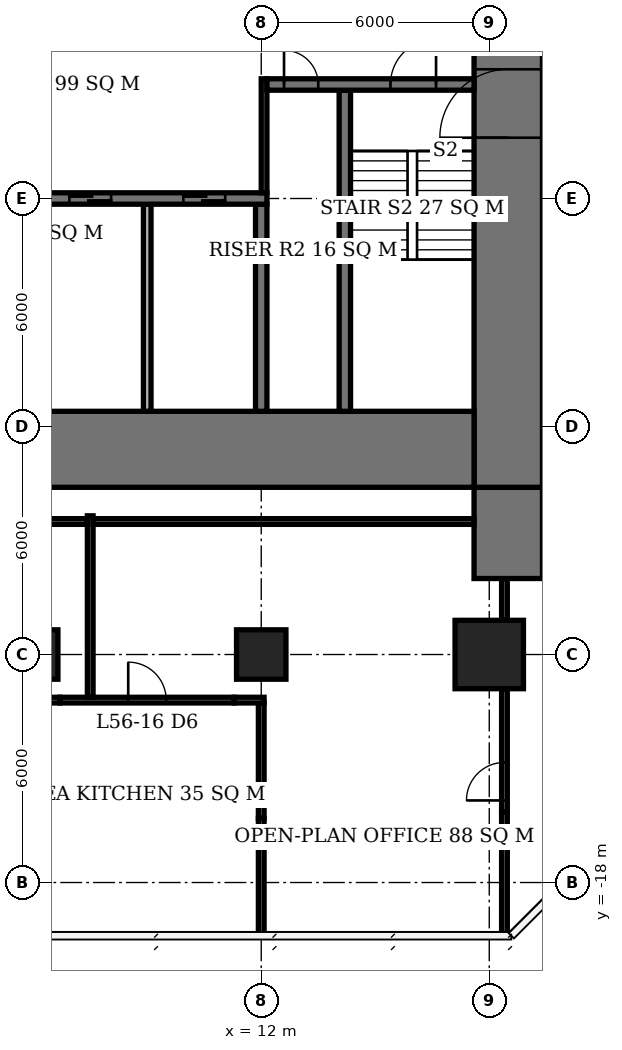
"""IFC4 building model, lengths in metres.
Left out: names, types, materials, properties, quantities, classifications, styles, units other than length and angle.
Written with IfcOpenShell. Run it as: python <this file> out.ifc"""

import sys

from ifc_helpers import new_model, si_unit, direction, frame, frame_2d, origin, origin_2d, place, context, subcontext, project, spatial, rectangle, extrude, element, fill, save


model = new_model("IFC4")
c1 = context("Model", 3, precision=1e-05, world=origin(), true_north=direction((0.0, 1.0)))
c2 = subcontext(c1, "Body", "Model", "MODEL_VIEW")
j1 = project(units=[si_unit("LENGTHUNIT", "METRE"), si_unit("PLANEANGLEUNIT", "RADIAN")], contexts=[c1])
p1 = place(None, origin())
s1 = spatial("IfcSite", under=j1, at=p1, CompositionType="ELEMENT")
p2 = place(p1, origin())
s2 = spatial("IfcBuilding", under=s1, at=p2, CompositionType="ELEMENT")
p3 = place(p2, frame((0.0, 0.0, 227.9)))
s3 = spatial("IfcBuildingStorey", under=s2, at=p3, CompositionType="ELEMENT", Elevation=227.9)
for number, where, z_axis, x_axis in (
    (1, (6.0, -12.0, 0.0), (0.0, 0.0, 1.0), (1.0, 0.0, 0.0)),
    (2, (12.0, -12.0, 0.0), (0.0, 0.0, 1.0), (1.0, 0.0, 0.0)),
):
    element("IfcColumn", number, at=place(p3, frame(where, z_axis=z_axis, x_axis=x_axis)), inside=s3, PredefinedType="COLUMN", context=c2, shape_type="SweptSolid", body=[
        extrude(rectangle(XDim=1.3, YDim=1.3, at=origin_2d()), origin(), (0.0, 0.0, 1.0), 3.9),
    ])
p4 = place(p3, frame((18.0, -12.0, 0.0), z_axis=(0.0, 0.0, 1.0), x_axis=(1.0, 0.0, 0.0)))
e3 = element("IfcColumn", 3, at=p4, inside=s3, PredefinedType="COLUMN", context=c2, shape_type="SweptSolid", body=[
    extrude(rectangle(XDim=1.8, YDim=1.8, at=origin_2d()), origin(), (0.0, 0.0, 1.0), 3.9),
])
p5 = place(p3, frame((-5.6, -6.6, 0.0), z_axis=(0.0, 0.0, 1.0), x_axis=(1.0, 0.0, 0.0)))
e4 = element("IfcWall", 4, at=p5, inside=s3, PredefinedType="SHEAR", context=c2, shape_type="SweptSolid", body=[
    extrude(rectangle(XDim=23.2, YDim=2.0, at=frame_2d((11.6, 0.0))), origin(), (0.0, 0.0, 1.0), 3.9),
])
p6 = place(p3, frame((18.5, -7.6, 0.0), z_axis=(0.0, 0.0, 1.0), x_axis=(0.0, 1.0, 0.0)))
e5 = element("IfcWall", 5, at=p6, inside=s3, PredefinedType="SHEAR", context=c2, shape_type="SweptSolid", body=[
    extrude(rectangle(XDim=21.2, YDim=1.8, at=frame_2d((10.6, 0.0))), origin(), (0.0, 0.0, 1.0), 3.9),
])
p7 = place(p6, frame((9.2, 0.0, 0.0)))
e6 = element("IfcOpeningElement", 6, at=p7, cuts=e5, PredefinedType="OPENING", context=c2, shape_type="SweptSolid", body=[
    extrude(rectangle(XDim=1.8, YDim=2.4, at=frame_2d((0.9, 1.2))), frame((0.0, 0.91, 0.0), z_axis=(0.0, -1.0, 0.0), x_axis=(1.0, 0.0, 0.0)), (0.0, 0.0, 1.0), 1.82),
])
p8 = place(p3, frame((18.5, -10.0, 0.0), z_axis=(0.0, 0.0, 1.0), x_axis=(0.0, 1.0, 0.0)))
e7 = element("IfcWall", 7, at=p8, inside=s3, PredefinedType="SHEAR", context=c2, shape_type="SweptSolid", body=[
    extrude(rectangle(XDim=2.4, YDim=1.8, at=frame_2d((1.2, 0.0))), origin(), (0.0, 0.0, 1.0), 3.9),
])
p9 = place(p3, frame((-5.6, 0.0, 0.0), z_axis=(0.0, 0.0, 1.0), x_axis=(1.0, 0.0, 0.0)))
e8 = element("IfcWall", 8, at=p9, inside=s3, PredefinedType="SHEAR", context=c2, shape_type="SweptSolid", body=[
    extrude(rectangle(XDim=17.75, YDim=0.3, at=frame_2d((8.875, 0.0))), origin(), (0.0, 0.0, 1.0), 3.9),
])
p10 = place(p9, frame((0.6, 0.0, 0.0)))
e9 = element("IfcOpeningElement", 9, at=p10, cuts=e8, PredefinedType="OPENING", context=c2, shape_type="SweptSolid", body=[
    extrude(rectangle(XDim=0.9, YDim=2.1, at=frame_2d((0.45, 1.05))), frame((0.0, 0.16, 0.0), z_axis=(0.0, -1.0, 0.0), x_axis=(1.0, 0.0, 0.0)), (0.0, 0.0, 1.0), 0.32),
])
p11 = place(p9, frame((3.7, 0.0, 0.0)))
e10 = element("IfcOpeningElement", 10, at=p11, cuts=e8, PredefinedType="OPENING", context=c2, shape_type="SweptSolid", body=[
    extrude(rectangle(XDim=1.0, YDim=2.1, at=frame_2d((0.5, 1.05))), frame((0.0, 0.16, 0.0), z_axis=(0.0, -1.0, 0.0), x_axis=(1.0, 0.0, 0.0)), (0.0, 0.0, 1.0), 0.32),
])
p12 = place(p9, frame((9.6, 0.0, 0.0)))
e11 = element("IfcOpeningElement", 11, at=p12, cuts=e8, PredefinedType="OPENING", context=c2, shape_type="SweptSolid", body=[
    extrude(rectangle(XDim=1.0, YDim=2.1, at=frame_2d((0.5, 1.05))), frame((0.0, 0.16, 0.0), z_axis=(0.0, -1.0, 0.0), x_axis=(1.0, 0.0, 0.0)), (0.0, 0.0, 1.0), 0.32),
])
p13 = place(p9, frame((12.55, 0.0, 0.0)))
e12 = element("IfcOpeningElement", 12, at=p13, cuts=e8, PredefinedType="OPENING", context=c2, shape_type="SweptSolid", body=[
    extrude(rectangle(XDim=1.1, YDim=2.1, at=frame_2d((0.55, 1.05))), frame((0.0, 0.16, 0.0), z_axis=(0.0, -1.0, 0.0), x_axis=(1.0, 0.0, 0.0)), (0.0, 0.0, 1.0), 0.32),
])
p14 = place(p9, frame((15.55, 0.0, 0.0)))
e13 = element("IfcOpeningElement", 13, at=p14, cuts=e8, PredefinedType="OPENING", context=c2, shape_type="SweptSolid", body=[
    extrude(rectangle(XDim=1.1, YDim=2.1, at=frame_2d((0.55, 1.05))), frame((0.0, 0.16, 0.0), z_axis=(0.0, -1.0, 0.0), x_axis=(1.0, 0.0, 0.0)), (0.0, 0.0, 1.0), 0.32),
])
p15 = place(p3, frame((12.15, 3.0, 0.0), z_axis=(0.0, 0.0, 1.0), x_axis=(1.0, 0.0, 0.0)))
e14 = element("IfcWall", 14, at=p15, inside=s3, PredefinedType="SHEAR", context=c2, shape_type="SweptSolid", body=[
    extrude(rectangle(XDim=5.45, YDim=0.3, at=frame_2d((2.725, 0.0))), origin(), (0.0, 0.0, 1.0), 3.9),
])
p16 = place(p15, frame((3.25, 0.0, 0.0)))
e15 = element("IfcOpeningElement", 15, at=p16, cuts=e14, PredefinedType="OPENING", context=c2, shape_type="SweptSolid", body=[
    extrude(rectangle(XDim=1.2, YDim=2.1, at=frame_2d((0.6, 1.05))), frame((0.0, 0.16, 0.0), z_axis=(0.0, -1.0, 0.0), x_axis=(1.0, 0.0, 0.0)), (0.0, 0.0, 1.0), 0.32),
])
p17 = place(p15, frame((0.45, 0.0, 0.0)))
e16 = element("IfcOpeningElement", 16, at=p17, cuts=e14, PredefinedType="OPENING", context=c2, shape_type="SweptSolid", body=[
    extrude(rectangle(XDim=0.9, YDim=2.1, at=frame_2d((0.45, 1.05))), frame((0.0, 0.16, 0.0), z_axis=(0.0, -1.0, 0.0), x_axis=(1.0, 0.0, 0.0)), (0.0, 0.0, 1.0), 0.32),
])
p18 = place(p3, frame((12.0, -5.6, 0.0), z_axis=(0.0, 0.0, 1.0), x_axis=(0.0, 1.0, 0.0)))
e17 = element("IfcWall", 17, at=p18, inside=s3, PredefinedType="SHEAR", context=c2, shape_type="SweptSolid", body=[
    extrude(rectangle(XDim=5.45, YDim=0.3, at=frame_2d((2.725, 0.0))), origin(), (0.0, 0.0, 1.0), 3.9),
])
p19 = place(p3, frame((14.2, -5.6, 0.0), z_axis=(0.0, 0.0, 1.0), x_axis=(0.0, 1.0, 0.0)))
e18 = element("IfcWall", 18, at=p19, inside=s3, PredefinedType="SHEAR", context=c2, shape_type="SweptSolid", body=[
    extrude(rectangle(XDim=8.45, YDim=0.3, at=frame_2d((4.225, 0.0))), origin(), (0.0, 0.0, 1.0), 3.9),
])
p20 = place(p3, frame((9.0, -5.6, 0.0), z_axis=(0.0, 0.0, 1.0), x_axis=(0.0, 1.0, 0.0)))
e19 = element("IfcWall", 19, at=p20, inside=s3, PredefinedType="SOLIDWALL", context=c2, shape_type="SweptSolid", body=[
    extrude(rectangle(XDim=5.45, YDim=0.2, at=frame_2d((2.725, 0.0))), origin(), (0.0, 0.0, 1.0), 3.9),
])
p21 = place(p3, frame((5.925, -13.2, 0.0), z_axis=(0.0, 0.0, 1.0), x_axis=(1.0, 0.0, 0.0)))
e20 = element("IfcWall", 20, at=p21, inside=s3, PredefinedType="PARTITIONING", context=c2, shape_type="SweptSolid", body=[
    extrude(rectangle(XDim=0.785, YDim=0.15, at=frame_2d((0.393, 0.0))), origin(), (0.0, 0.0, 1.0), 2.65),
])
p22 = place(p3, frame((6.71, -13.2, 0.0), z_axis=(0.0, 0.0, 1.0), x_axis=(1.0, 0.0, 0.0)))
e21 = element("IfcWall", 21, at=p22, inside=s3, PredefinedType="PARTITIONING", context=c2, shape_type="SweptSolid", body=[
    extrude(rectangle(XDim=4.58, YDim=0.15, at=frame_2d((2.29, 0.0))), origin(), (0.0, 0.0, 1.0), 3.65),
])
p23 = place(p22, frame((1.79, 0.0, 0.0)))
e22 = element("IfcOpeningElement", 22, at=p23, cuts=e21, PredefinedType="OPENING", context=c2, shape_type="SweptSolid", body=[
    extrude(rectangle(XDim=1.0, YDim=2.1, at=frame_2d((0.5, 1.05))), frame((0.0, 0.085, 0.0), z_axis=(0.0, -1.0, 0.0), x_axis=(1.0, 0.0, 0.0)), (0.0, 0.0, 1.0), 0.17),
])
p24 = place(p3, frame((11.29, -13.2, 0.0), z_axis=(0.0, 0.0, 1.0), x_axis=(1.0, 0.0, 0.0)))
e23 = element("IfcWall", 23, at=p24, inside=s3, PredefinedType="PARTITIONING", context=c2, shape_type="SweptSolid", body=[
    extrude(rectangle(XDim=0.785, YDim=0.15, at=frame_2d((0.393, 0.0))), origin(), (0.0, 0.0, 1.0), 2.65),
])
p25 = place(p3, frame((12.0, -19.4, 0.0), z_axis=(0.0, 0.0, 1.0), x_axis=(0.0, 1.0, 0.0)))
e24 = element("IfcWall", 24, at=p25, inside=s3, PredefinedType="PARTITIONING", context=c2, shape_type="SweptSolid", body=[
    extrude(rectangle(XDim=3.09, YDim=0.15, at=frame_2d((1.545, 0.0))), origin(), (0.0, 0.0, 1.0), 3.65),
])
p26 = place(p3, frame((12.0, -16.31, 0.0), z_axis=(0.0, 0.0, 1.0), x_axis=(0.0, 1.0, 0.0)))
e25 = element("IfcWall", 25, at=p26, inside=s3, PredefinedType="PARTITIONING", context=c2, shape_type="SweptSolid", body=[
    extrude(rectangle(XDim=3.035, YDim=0.15, at=frame_2d((1.518, 0.0))), origin(), (0.0, 0.0, 1.0), 2.65),
])
p27 = place(p3, frame((7.425, -8.5, 0.0), z_axis=(0.0, 0.0, 1.0), x_axis=(-1.0, 0.0, 0.0)))
e26 = element("IfcWall", 26, at=p27, inside=s3, PredefinedType="PARTITIONING", context=c2, shape_type="SweptSolid", body=[
    extrude(rectangle(XDim=8.925, YDim=0.15, at=frame_2d((4.462, 0.0))), origin(), (0.0, 0.0, 1.0), 3.65),
])
p28 = place(p27, frame((5.275, 0.0, 0.0)))
e27 = element("IfcOpeningElement", 27, at=p28, cuts=e26, PredefinedType="OPENING", context=c2, shape_type="SweptSolid", body=[
    extrude(rectangle(XDim=1.0, YDim=2.1, at=frame_2d((0.5, 1.05))), frame((0.0, 0.085, 0.0), z_axis=(0.0, -1.0, 0.0), x_axis=(1.0, 0.0, 0.0)), (0.0, 0.0, 1.0), 0.17),
])
p29 = place(p3, frame((7.5, -13.125, 0.0), z_axis=(0.0, 0.0, 1.0), x_axis=(0.0, 1.0, 0.0)))
e28 = element("IfcWall", 28, at=p29, inside=s3, PredefinedType="PARTITIONING", context=c2, shape_type="SweptSolid", body=[
    extrude(rectangle(XDim=4.775, YDim=0.15, at=frame_2d((2.387, 0.0))), origin(), (0.0, 0.0, 1.0), 3.65),
])
p30 = place(p3, frame((7.575, -8.5, 0.0), z_axis=(0.0, 0.0, 1.0), x_axis=(1.0, 0.0, 0.0)))
e29 = element("IfcWall", 29, at=p30, inside=s3, PredefinedType="PARTITIONING", context=c2, shape_type="SweptSolid", body=[
    extrude(rectangle(XDim=10.025, YDim=0.15, at=frame_2d((5.013, 0.0))), origin(), (0.0, 0.0, 1.0), 3.65),
])
p31 = place(p3, frame((18.4, -19.4, 0.0), z_axis=(0.0, 0.0, 1.0), x_axis=(0.0, 1.0, 0.0)))
e30 = element("IfcWall", 30, at=p31, inside=s3, PredefinedType="PARTITIONING", context=c2, shape_type="SweptSolid", body=[
    extrude(rectangle(XDim=3.26, YDim=0.15, at=frame_2d((1.63, 0.0))), origin(), (0.0, 0.0, 1.0), 3.65),
])
p32 = place(p3, frame((18.4, -16.14, 0.0), z_axis=(0.0, 0.0, 1.0), x_axis=(0.0, 1.0, 0.0)))
e31 = element("IfcWall", 31, at=p32, inside=s3, PredefinedType="PARTITIONING", context=c2, shape_type="SweptSolid", body=[
    extrude(rectangle(XDim=3.24, YDim=0.15, at=frame_2d((1.62, 0.0))), origin(), (0.0, 0.0, 1.0), 2.65),
])
p33 = place(p32, frame((0.3, 0.0, 0.0)))
e32 = element("IfcOpeningElement", 32, at=p33, cuts=e31, PredefinedType="OPENING", context=c2, shape_type="SweptSolid", body=[
    extrude(rectangle(XDim=1.0, YDim=2.1, at=frame_2d((0.5, 1.05))), frame((0.0, 0.085, 0.0), z_axis=(0.0, -1.0, 0.0), x_axis=(1.0, 0.0, 0.0)), (0.0, 0.0, 1.0), 0.17),
])
p34 = place(p3, frame((18.4, -11.1, 0.0), z_axis=(0.0, 0.0, 1.0), x_axis=(0.0, 1.0, 0.0)))
e33 = element("IfcWall", 33, at=p34, inside=s3, PredefinedType="PARTITIONING", context=c2, shape_type="SweptSolid", body=[
    extrude(rectangle(XDim=1.1, YDim=0.15, at=frame_2d((0.55, 0.0))), origin(), (0.0, 0.0, 1.0), 3.65),
])
p35 = place(p3, frame((12.075, 0.15, 0.0), z_axis=(0.0, 0.0, 1.0), x_axis=(0.0, 1.0, 0.0)))
e34 = element("IfcWall", 34, at=p35, inside=s3, PredefinedType="PARTITIONING", context=c2, shape_type="SweptSolid", body=[
    extrude(rectangle(XDim=3.0, YDim=0.15, at=frame_2d((1.5, 0.0))), origin(), (0.0, 0.0, 1.0), 3.65),
])
p36 = place(p7, origin())
e35 = element("IfcDoor", 35, at=p36, inside=s3, OperationType="DOUBLE_DOOR_SINGLE_SWING", PredefinedType="DOOR", context=c2, shape_type="SweptSolid", body=[
    extrude(rectangle(XDim=1.8, YDim=2.4, at=frame_2d((0.9, 1.2))), frame((0.0, 0.025, 0.0), z_axis=(0.0, -1.0, 0.0), x_axis=(1.0, 0.0, 0.0)), (0.0, 0.0, 1.0), 0.05),
])
fill(e6, e35)
p37 = place(p16, origin())
e36 = element("IfcDoor", 36, at=p37, inside=s3, OperationType="SINGLE_SWING_RIGHT", PredefinedType="DOOR", context=c2, shape_type="SweptSolid", body=[
    extrude(rectangle(XDim=1.2, YDim=2.1, at=frame_2d((0.6, 1.05))), frame((0.0, 0.025, 0.0), z_axis=(0.0, -1.0, 0.0), x_axis=(1.0, 0.0, 0.0)), (0.0, 0.0, 1.0), 0.05),
])
fill(e15, e36)
p38 = place(p17, origin())
e37 = element("IfcDoor", 37, at=p38, inside=s3, OperationType="SINGLE_SWING_LEFT", PredefinedType="DOOR", context=c2, shape_type="SweptSolid", body=[
    extrude(rectangle(XDim=0.9, YDim=2.1, at=frame_2d((0.45, 1.05))), frame((0.0, 0.025, 0.0), z_axis=(0.0, -1.0, 0.0), x_axis=(1.0, 0.0, 0.0)), (0.0, 0.0, 1.0), 0.05),
])
fill(e16, e37)
p39 = place(p13, origin())
e38 = element("IfcDoor", 38, at=p39, inside=s3, OperationType="DOUBLE_DOOR_SLIDING", PredefinedType="USERDEFINED", context=c2, shape_type="SweptSolid", body=[
    extrude(rectangle(XDim=1.1, YDim=2.1, at=frame_2d((0.55, 1.05))), frame((0.0, 0.025, 0.0), z_axis=(0.0, -1.0, 0.0), x_axis=(1.0, 0.0, 0.0)), (0.0, 0.0, 1.0), 0.05),
])
fill(e12, e38)
p40 = place(p14, origin())
e39 = element("IfcDoor", 39, at=p40, inside=s3, OperationType="DOUBLE_DOOR_SLIDING", PredefinedType="USERDEFINED", context=c2, shape_type="SweptSolid", body=[
    extrude(rectangle(XDim=1.1, YDim=2.1, at=frame_2d((0.55, 1.05))), frame((0.0, 0.025, 0.0), z_axis=(0.0, -1.0, 0.0), x_axis=(1.0, 0.0, 0.0)), (0.0, 0.0, 1.0), 0.05),
])
fill(e13, e39)
p41 = place(p23, origin())
e40 = element("IfcDoor", 40, at=p41, inside=s3, OperationType="SINGLE_SWING_LEFT", PredefinedType="DOOR", context=c2, shape_type="SweptSolid", body=[
    extrude(rectangle(XDim=1.0, YDim=2.1, at=frame_2d((0.5, 1.05))), frame((0.0, 0.025, 0.0), z_axis=(0.0, -1.0, 0.0), x_axis=(1.0, 0.0, 0.0)), (0.0, 0.0, 1.0), 0.05),
])
fill(e22, e40)
p42 = place(p33, origin())
e41 = element("IfcDoor", 41, at=p42, inside=s3, OperationType="SINGLE_SWING_LEFT", PredefinedType="DOOR", context=c2, shape_type="SweptSolid", body=[
    extrude(rectangle(XDim=1.0, YDim=2.1, at=frame_2d((0.5, 1.05))), frame((0.0, 0.025, 0.0), z_axis=(0.0, -1.0, 0.0), x_axis=(1.0, 0.0, 0.0)), (0.0, 0.0, 1.0), 0.05),
])
fill(e32, e41)
save(model, sys.argv[1])
